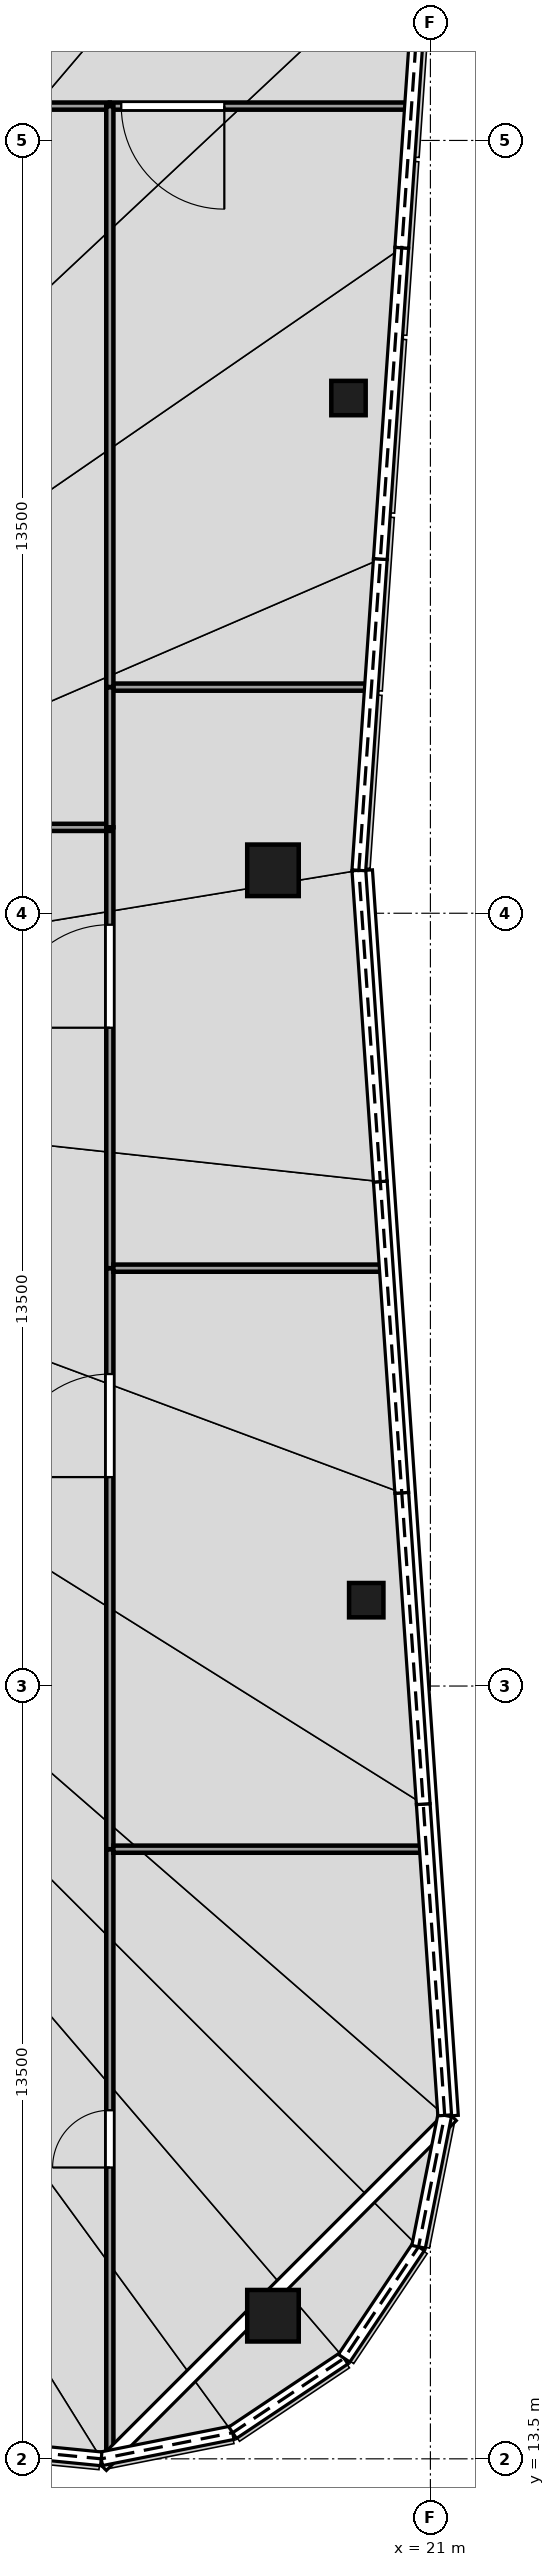
"""IFC4 building model, lengths in metres.
Left out: names, types, materials, properties, quantities, classifications, styles, units other than length and angle.
Written with IfcOpenShell. Run it as: python <this file> out.ifc"""

import sys

from ifc_helpers import new_model, si_unit, direction, frame, frame_2d, origin, origin_2d, place, context, subcontext, project, spatial, rectangle, hollow_rectangle, extrude, element, fill, save


model = new_model("IFC4")
c1 = context("Model", 3, precision=1e-05, world=origin(), true_north=direction((0.0, 1.0)))
c2 = subcontext(c1, "Body", "Model", "MODEL_VIEW")
j1 = project(units=[si_unit("LENGTHUNIT", "METRE"), si_unit("PLANEANGLEUNIT", "RADIAN")], contexts=[c1])
p1 = place(None, origin())
s1 = spatial("IfcSite", under=j1, at=p1, CompositionType="ELEMENT")
p2 = place(p1, origin())
s2 = spatial("IfcBuilding", under=s1, at=p2, CompositionType="ELEMENT")
p3 = place(p2, frame((0.0, 0.0, 368.0)))
s3 = spatial("IfcBuildingStorey", under=s2, at=p3, CompositionType="ELEMENT", Elevation=368.0)
for number, where, z_axis, x_axis in (
    (1, (18.25, 41.25, 0.0), (0.0, 0.0, 1.0), (1.0, 0.0, 0.0)),
    (2, (18.25, 16.0, 0.0), (0.0, 0.0, 1.0), (1.0, 0.0, 0.0)),
):
    element("IfcColumn", number, at=place(p3, frame(where, z_axis=z_axis, x_axis=x_axis)), inside=s3, PredefinedType="COLUMN", context=c2, shape_type="SweptSolid", body=[
        extrude(hollow_rectangle(XDim=0.9, YDim=0.9, WallThickness=0.04, at=origin_2d()), origin(), (0.0, 0.0, 1.0), 3.3),
    ])
for number, where, z_axis, x_axis in (
    (3, (19.879, 28.5, 0.0), (0.0, 0.0, 1.0), (1.0, 0.0, 0.0)),
    (4, (19.569, 49.5, 0.0), (0.0, 0.0, 1.0), (1.0, 0.0, 0.0)),
):
    element("IfcColumn", number, at=place(p3, frame(where, z_axis=z_axis, x_axis=x_axis)), inside=s3, PredefinedType="COLUMN", context=c2, shape_type="SweptSolid", body=[
        extrude(hollow_rectangle(XDim=0.6, YDim=0.6, WallThickness=0.025, at=origin_2d()), origin(), (0.0, 0.0, 1.0), 3.3),
    ])
p4 = place(p3, frame((15.4, 13.45, 0.0), z_axis=(0.0, 0.0, 1.0), x_axis=(0.0, 1.0, 0.0)))
e5 = element("IfcWall", 5, at=p4, inside=s3, PredefinedType="PARTITIONING", context=c2, shape_type="SweptSolid", body=[
    extrude(rectangle(XDim=10.7, YDim=0.125, at=frame_2d((5.35, 0.0))), origin(), (0.0, 0.0, 1.0), 2.262),
])
p5 = place(p4, frame((5.139, 0.0, 0.0)))
e6 = element("IfcOpeningElement", 6, at=p5, cuts=e5, PredefinedType="OPENING", context=c2, shape_type="SweptSolid", body=[
    extrude(rectangle(XDim=1.0, YDim=2.1, at=frame_2d((0.5, 1.05))), frame((0.0, 0.073, 0.0), z_axis=(0.0, -1.0, 0.0), x_axis=(1.0, 0.0, 0.0)), (0.0, 0.0, 1.0), 0.145),
])
p6 = place(p3, frame((15.4, 24.15, 0.0), z_axis=(0.0, 0.0, 1.0), x_axis=(0.0, 1.0, 0.0)))
e7 = element("IfcWall", 7, at=p6, inside=s3, PredefinedType="PARTITIONING", context=c2, shape_type="SweptSolid", body=[
    extrude(rectangle(XDim=10.15, YDim=0.125, at=frame_2d((5.075, 0.0))), origin(), (0.0, 0.0, 1.0), 2.97),
])
p7 = place(p6, frame((6.5, 0.0, 0.0)))
e8 = element("IfcOpeningElement", 8, at=p7, cuts=e7, PredefinedType="OPENING", context=c2, shape_type="SweptSolid", body=[
    extrude(rectangle(XDim=1.8, YDim=2.4, at=frame_2d((0.9, 1.2))), frame((0.0, 0.073, 0.0), z_axis=(0.0, -1.0, 0.0), x_axis=(1.0, 0.0, 0.0)), (0.0, 0.0, 1.0), 0.145),
])
p8 = place(p3, frame((15.4, 34.3, 0.0), z_axis=(0.0, 0.0, 1.0), x_axis=(0.0, 1.0, 0.0)))
e9 = element("IfcWall", 9, at=p8, inside=s3, PredefinedType="PARTITIONING", context=c2, shape_type="SweptSolid", body=[
    extrude(rectangle(XDim=7.7, YDim=0.125, at=frame_2d((3.85, 0.0))), origin(), (0.0, 0.0, 1.0), 2.57),
])
p9 = place(p8, frame((4.2, 0.0, 0.0)))
e10 = element("IfcOpeningElement", 10, at=p9, cuts=e9, PredefinedType="OPENING", context=c2, shape_type="SweptSolid", body=[
    extrude(rectangle(XDim=1.8, YDim=2.4, at=frame_2d((0.9, 1.2))), frame((0.0, 0.073, 0.0), z_axis=(0.0, -1.0, 0.0), x_axis=(1.0, 0.0, 0.0)), (0.0, 0.0, 1.0), 0.145),
])
p10 = place(p3, frame((20.751, 54.6, 0.0), z_axis=(0.0, 0.0, 1.0), x_axis=(-1.0, 0.0, 0.0)))
e11 = element("IfcWall", 11, at=p10, inside=s3, PredefinedType="PARTITIONING", context=c2, shape_type="SweptSolid", body=[
    extrude(rectangle(XDim=5.351, YDim=0.125, at=frame_2d((2.675, 0.0))), origin(), (0.0, 0.0, 1.0), 2.47),
])
p11 = place(p10, frame((3.351, 0.0, 0.0)))
e12 = element("IfcOpeningElement", 12, at=p11, cuts=e11, PredefinedType="OPENING", context=c2, shape_type="SweptSolid", body=[
    extrude(rectangle(XDim=1.8, YDim=2.4, at=frame_2d((0.9, 1.2))), frame((0.0, 0.073, 0.0), z_axis=(0.0, -1.0, 0.0), x_axis=(1.0, 0.0, 0.0)), (0.0, 0.0, 1.0), 0.145),
])
p12 = place(p3, frame((15.462, 24.15, 0.0), z_axis=(0.0, 0.0, 1.0), x_axis=(1.0, 0.0, 0.0)))
e13 = element("IfcWall", 13, at=p12, inside=s3, PredefinedType="PARTITIONING", context=c2, shape_type="SweptSolid", body=[
    extrude(rectangle(XDim=5.547, YDim=0.125, at=frame_2d((2.773, 0.0))), origin(), (0.0, 0.0, 1.0), 2.47),
])
p13 = place(p3, frame((15.462, 34.3, 0.0), z_axis=(0.0, 0.0, 1.0), x_axis=(1.0, 0.0, 0.0)))
e14 = element("IfcWall", 14, at=p13, inside=s3, PredefinedType="PARTITIONING", context=c2, shape_type="SweptSolid", body=[
    extrude(rectangle(XDim=4.847, YDim=0.125, at=frame_2d((2.423, 0.0))), origin(), (0.0, 0.0, 1.0), 2.47),
])
p14 = place(p3, frame((15.4, 44.45, 0.0), z_axis=(0.0, 0.0, 1.0), x_axis=(1.0, 0.0, 0.0)))
e15 = element("IfcWall", 15, at=p14, inside=s3, PredefinedType="PARTITIONING", context=c2, shape_type="SweptSolid", body=[
    extrude(rectangle(XDim=4.651, YDim=0.125, at=frame_2d((2.325, 0.0))), origin(), (0.0, 0.0, 1.0), 2.47),
])
p15 = place(p3, frame((15.398, 54.6, 0.0), z_axis=(0.0, 0.0, 1.0), x_axis=(-1.0, 0.0, 0.0)))
e16 = element("IfcWall", 16, at=p15, inside=s3, PredefinedType="PARTITIONING", context=c2, shape_type="SweptSolid", body=[
    extrude(rectangle(XDim=2.398, YDim=0.125, at=frame_2d((1.199, 0.0))), origin(), (0.0, 0.0, 1.0), 3.3),
])
p16 = place(p3, frame((13.062, 42.0, 0.0), z_axis=(0.0, 0.0, 1.0), x_axis=(1.0, 0.0, 0.0)))
e17 = element("IfcWall", 17, at=p16, inside=s3, PredefinedType="PARTITIONING", context=c2, shape_type="SweptSolid", body=[
    extrude(rectangle(XDim=2.335, YDim=0.125, at=frame_2d((1.168, 0.0))), origin(), (0.0, 0.0, 1.0), 3.3),
])
p17 = place(p3, frame((15.4, 42.002, 0.0), z_axis=(0.0, 0.0, 1.0), x_axis=(0.0, 1.0, 0.0)))
e18 = element("IfcWall", 18, at=p17, inside=s3, PredefinedType="PARTITIONING", context=c2, shape_type="SweptSolid", body=[
    extrude(rectangle(XDim=2.446, YDim=0.125, at=frame_2d((1.223, 0.0))), origin(), (0.0, 0.0, 1.0), 3.3),
])
p18 = place(p3, frame((15.4, 44.452, 0.0), z_axis=(0.0, 0.0, 1.0), x_axis=(0.0, 1.0, 0.0)))
e19 = element("IfcWall", 19, at=p18, inside=s3, PredefinedType="PARTITIONING", context=c2, shape_type="SweptSolid", body=[
    extrude(rectangle(XDim=10.146, YDim=0.125, at=frame_2d((5.073, 0.0))), origin(), (0.0, 0.0, 1.0), 2.78),
])
p19 = place(p5, origin())
e20 = element("IfcDoor", 20, at=p19, inside=s3, OperationType="SINGLE_SWING_RIGHT", PredefinedType="DOOR", context=c2, shape_type="SweptSolid", body=[
    extrude(rectangle(XDim=1.0, YDim=2.1, at=frame_2d((0.5, 1.05))), frame((0.0, 0.025, 0.0), z_axis=(0.0, -1.0, 0.0), x_axis=(1.0, 0.0, 0.0)), (0.0, 0.0, 1.0), 0.05),
])
fill(e6, e20)
p20 = place(p7, origin())
e21 = element("IfcDoor", 21, at=p20, inside=s3, OperationType="DOUBLE_DOOR_SINGLE_SWING", PredefinedType="DOOR", context=c2, shape_type="SweptSolid", body=[
    extrude(rectangle(XDim=1.8, YDim=2.4, at=frame_2d((0.9, 1.2))), frame((0.0, 0.025, 0.0), z_axis=(0.0, -1.0, 0.0), x_axis=(1.0, 0.0, 0.0)), (0.0, 0.0, 1.0), 0.05),
])
fill(e8, e21)
p21 = place(p9, origin())
e22 = element("IfcDoor", 22, at=p21, inside=s3, OperationType="DOUBLE_DOOR_SINGLE_SWING", PredefinedType="DOOR", context=c2, shape_type="SweptSolid", body=[
    extrude(rectangle(XDim=1.8, YDim=2.4, at=frame_2d((0.9, 1.2))), frame((0.0, 0.025, 0.0), z_axis=(0.0, -1.0, 0.0), x_axis=(1.0, 0.0, 0.0)), (0.0, 0.0, 1.0), 0.05),
])
fill(e10, e22)
p22 = place(p11, origin())
e23 = element("IfcDoor", 23, at=p22, inside=s3, OperationType="DOUBLE_DOOR_SINGLE_SWING", PredefinedType="DOOR", context=c2, shape_type="SweptSolid", body=[
    extrude(rectangle(XDim=1.8, YDim=2.4, at=frame_2d((0.9, 1.2))), frame((0.0, 0.025, 0.0), z_axis=(0.0, -1.0, 0.0), x_axis=(1.0, 0.0, 0.0)), (0.0, 0.0, 1.0), 0.05),
])
fill(e12, e23)
save(model, sys.argv[1])
